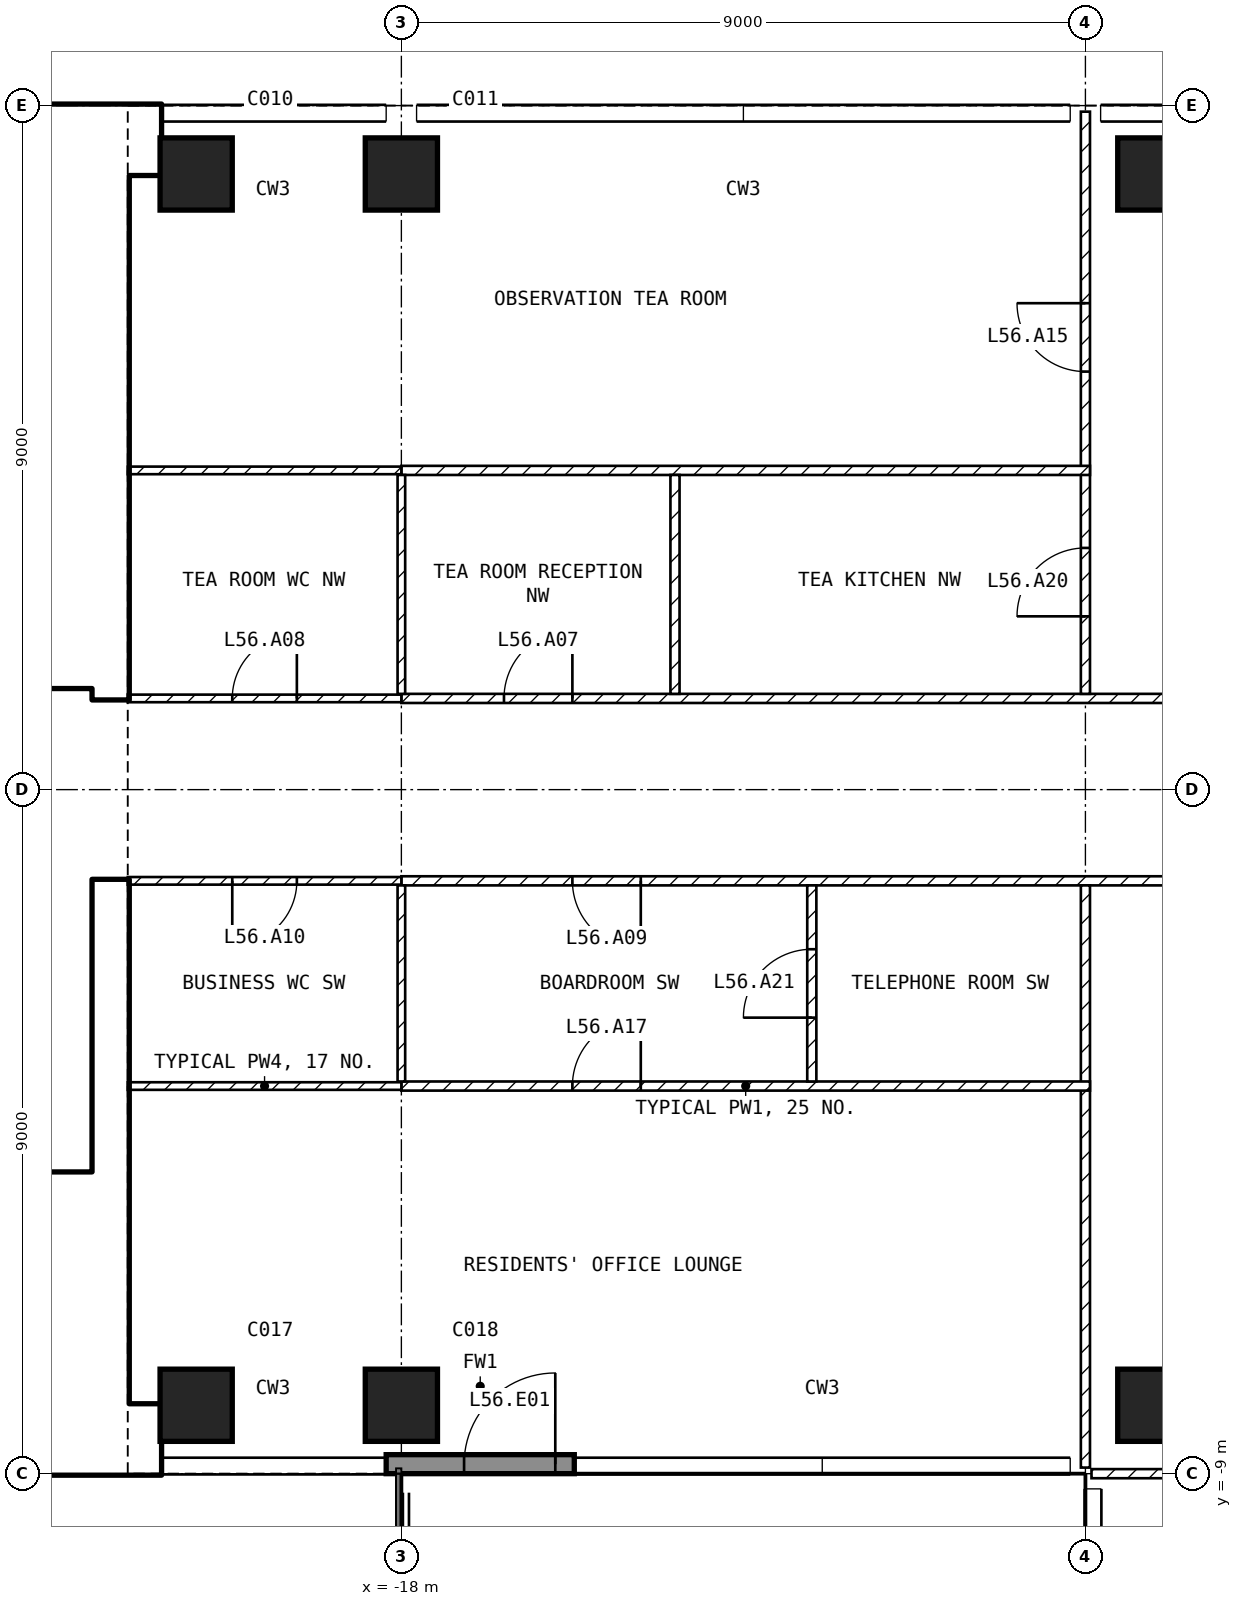
"""IFC4 building model, lengths in metres.
Left out: names, types, materials, properties, quantities, classifications, styles, units other than length and angle.
Written with IfcOpenShell. Run it as: python <this file> out.ifc"""

import sys

from ifc_helpers import new_model, si_unit, direction, frame, frame_2d, origin, origin_2d, place, context, subcontext, project, spatial, rectangle, extrude, element, fill, save


model = new_model("IFC4")
c1 = context("Model", 3, precision=1e-05, world=origin(), true_north=direction((0.0, 1.0)))
c2 = subcontext(c1, "Body", "Model", "MODEL_VIEW")
j1 = project(units=[si_unit("LENGTHUNIT", "METRE"), si_unit("PLANEANGLEUNIT", "RADIAN")], contexts=[c1])
p1 = place(None, origin())
s1 = spatial("IfcSite", under=j1, at=p1, CompositionType="ELEMENT")
p2 = place(p1, origin())
s2 = spatial("IfcBuilding", under=s1, at=p2, CompositionType="ELEMENT")
p3 = place(p2, frame((0.0, 0.0, 222.6)))
s3 = spatial("IfcBuildingStorey", under=s2, at=p3, CompositionType="ELEMENT", Elevation=222.6)
for number, where, z_axis, x_axis in (
    (1, (-20.7, -8.1, -0.3), (0.0, 0.0, 1.0), (1.0, 0.0, 0.0)),
    (2, (-20.7, 8.1, -0.3), (0.0, 0.0, 1.0), (1.0, 0.0, 0.0)),
    (3, (-18.0, -8.1, -0.3), (0.0, 0.0, 1.0), (1.0, 0.0, 0.0)),
    (4, (-18.0, 8.1, -0.3), (0.0, 0.0, 1.0), (1.0, 0.0, 0.0)),
    (5, (-8.1, -8.1, -0.3), (0.0, 0.0, 1.0), (1.0, 0.0, 0.0)),
    (6, (-8.1, 8.1, -0.3), (0.0, 0.0, 1.0), (1.0, 0.0, 0.0)),
):
    element("IfcColumn", number, at=place(p3, frame(where, z_axis=z_axis, x_axis=x_axis)), inside=s3, PredefinedType="COLUMN", context=c2, shape_type="SweptSolid", body=[
        extrude(rectangle(XDim=0.95, YDim=0.95, at=origin_2d()), origin(), (0.0, 0.0, 1.0), 5.25),
    ])
p4 = place(p3, frame((-18.2, -8.875, 0.0), z_axis=(0.0, 0.0, 1.0), x_axis=(1.0, 0.0, 0.0)))
e7 = element("IfcWall", 7, at=p4, inside=s3, PredefinedType="SOLIDWALL", context=c2, shape_type="SweptSolid", body=[
    extrude(rectangle(XDim=2.475, YDim=0.25, at=frame_2d((1.237, 0.0))), origin(), (0.0, 0.0, 1.0), 4.95),
])
p5 = place(p4, frame((1.025, 0.0, 0.0)))
e8 = element("IfcOpeningElement", 8, at=p5, cuts=e7, PredefinedType="OPENING", context=c2, shape_type="SweptSolid", body=[
    extrude(rectangle(XDim=1.2, YDim=2.4, at=frame_2d((0.6, 1.2))), frame((0.0, 0.135, 0.0), z_axis=(0.0, -1.0, 0.0), x_axis=(1.0, 0.0, 0.0)), (0.0, 0.0, 1.0), 0.27),
])
p6 = place(p3, frame((-30.2, -8.55, 0.0), z_axis=(0.0, 0.0, 1.0), x_axis=(1.0, 0.0, 0.0)))
e9 = element("IfcWall", 9, at=p6, inside=s3, PredefinedType="SHEAR", context=c2, shape_type="SweptSolid", body=[
    extrude(rectangle(XDim=9.025, YDim=0.9, at=frame_2d((4.512, 0.0))), origin(), (0.0, 0.0, 1.0), 4.95),
])
p7 = place(p3, frame((-29.6, 8.55, 0.0), z_axis=(0.0, 0.0, 1.0), x_axis=(1.0, 0.0, 0.0)))
e10 = element("IfcWall", 10, at=p7, inside=s3, PredefinedType="SHEAR", context=c2, shape_type="SweptSolid", body=[
    extrude(rectangle(XDim=8.425, YDim=0.9, at=frame_2d((4.212, 0.0))), origin(), (0.0, 0.0, 1.0), 4.95),
])
for number, where, z_axis, x_axis in (
    (11, (-21.825, -8.1, 0.0), (0.0, 0.0, 1.0), (0.0, 1.0, 0.0)),
    (12, (-21.825, 1.2, 0.0), (0.0, 0.0, 1.0), (0.0, 1.0, 0.0)),
):
    element("IfcWall", number, at=place(p3, frame(where, z_axis=z_axis, x_axis=x_axis)), inside=s3, PredefinedType="SHEAR", context=c2, shape_type="SweptSolid", body=[
        extrude(rectangle(XDim=6.9, YDim=0.45, at=frame_2d((3.45, 0.0))), origin(), (0.0, 0.0, 1.0), 4.95),
    ])
p8 = place(p3, frame((-33.2, 1.45, 0.0), z_axis=(0.0, 0.0, 1.0), x_axis=(1.0, 0.0, 0.0)))
e13 = element("IfcWall", 13, at=p8, inside=s3, PredefinedType="SOLIDWALL", context=c2, shape_type="SweptSolid", body=[
    extrude(rectangle(XDim=11.15, YDim=0.2, at=frame_2d((5.575, 0.0))), origin(), (0.0, 0.0, 1.0), 4.95),
])
p9 = place(p8, frame((9.4, 0.0, 0.0)))
e14 = element("IfcOpeningElement", 14, at=p9, cuts=e13, PredefinedType="OPENING", context=c2, shape_type="SweptSolid", body=[
    extrude(rectangle(XDim=1.0, YDim=2.1, at=frame_2d((0.5, 1.05))), frame((0.0, 0.11, 0.0), z_axis=(0.0, -1.0, 0.0), x_axis=(1.0, 0.0, 0.0)), (0.0, 0.0, 1.0), 0.22),
])
p10 = place(p8, frame((6.9, 0.0, 0.0)))
e15 = element("IfcOpeningElement", 15, at=p10, cuts=e13, PredefinedType="OPENING", context=c2, shape_type="SweptSolid", body=[
    extrude(rectangle(XDim=1.0, YDim=2.1, at=frame_2d((0.5, 1.05))), frame((0.0, 0.11, 0.0), z_axis=(0.0, -1.0, 0.0), x_axis=(1.0, 0.0, 0.0)), (0.0, 0.0, 1.0), 0.22),
])
p11 = place(p8, frame((1.1, 0.0, 0.0)))
e16 = element("IfcOpeningElement", 16, at=p11, cuts=e13, PredefinedType="OPENING", context=c2, shape_type="SweptSolid", body=[
    extrude(rectangle(XDim=0.9, YDim=2.1, at=frame_2d((0.45, 1.05))), frame((0.0, 0.11, 0.0), z_axis=(0.0, -1.0, 0.0), x_axis=(1.0, 0.0, 0.0)), (0.0, 0.0, 1.0), 0.22),
])
p12 = place(p3, frame((-28.35, 5.15, 0.0), z_axis=(0.0, 0.0, 1.0), x_axis=(1.0, 0.0, 0.0)))
e17 = element("IfcWall", 17, at=p12, inside=s3, PredefinedType="SOLIDWALL", context=c2, shape_type="SweptSolid", body=[
    extrude(rectangle(XDim=6.3, YDim=0.2, at=frame_2d((3.15, 0.0))), origin(), (0.0, 0.0, 1.0), 4.95),
])
p13 = place(p12, frame((5.1, 0.0, 0.0)))
e18 = element("IfcOpeningElement", 18, at=p13, cuts=e17, PredefinedType="OPENING", context=c2, shape_type="SweptSolid", body=[
    extrude(rectangle(XDim=1.0, YDim=2.1, at=frame_2d((0.5, 1.05))), frame((0.0, 0.11, 0.0), z_axis=(0.0, -1.0, 0.0), x_axis=(1.0, 0.0, 0.0)), (0.0, 0.0, 1.0), 0.22),
])
p14 = place(p3, frame((-28.35, -5.15, 0.0), z_axis=(0.0, 0.0, 1.0), x_axis=(1.0, 0.0, 0.0)))
e19 = element("IfcWall", 19, at=p14, inside=s3, PredefinedType="SOLIDWALL", context=c2, shape_type="SweptSolid", body=[
    extrude(rectangle(XDim=6.3, YDim=0.2, at=frame_2d((3.15, 0.0))), origin(), (0.0, 0.0, 1.0), 4.95),
])
p15 = place(p14, frame((5.1, 0.0, 0.0)))
e20 = element("IfcOpeningElement", 20, at=p15, cuts=e19, PredefinedType="OPENING", context=c2, shape_type="SweptSolid", body=[
    extrude(rectangle(XDim=1.0, YDim=2.1, at=frame_2d((0.5, 1.05))), frame((0.0, 0.11, 0.0), z_axis=(0.0, -1.0, 0.0), x_axis=(1.0, 0.0, 0.0)), (0.0, 0.0, 1.0), 0.22),
])
p16 = place(p3, frame((-18.0, 1.2, 0.0), z_axis=(0.0, 0.0, 1.0), x_axis=(1.0, 0.0, 0.0)))
e21 = element("IfcWall", 21, at=p16, inside=s3, PredefinedType="PARTITIONING", context=c2, shape_type="SweptSolid", body=[
    extrude(rectangle(XDim=30.6, YDim=0.12, at=frame_2d((15.3, 0.0))), origin(), (0.0, 0.0, 1.0), 4.95),
])
p17 = place(p16, frame((17.1, 0.0, 0.0)))
e22 = element("IfcOpeningElement", 22, at=p17, cuts=e21, PredefinedType="OPENING", context=c2, shape_type="SweptSolid", body=[
    extrude(rectangle(XDim=1.8, YDim=2.1, at=frame_2d((0.9, 1.05))), frame((0.0, 0.07, 0.0), z_axis=(0.0, -1.0, 0.0), x_axis=(1.0, 0.0, 0.0)), (0.0, 0.0, 1.0), 0.14),
])
p18 = place(p16, frame((1.35, 0.0, 0.0)))
e23 = element("IfcOpeningElement", 23, at=p18, cuts=e21, PredefinedType="OPENING", context=c2, shape_type="SweptSolid", body=[
    extrude(rectangle(XDim=0.9, YDim=2.1, at=frame_2d((0.45, 1.05))), frame((0.0, 0.07, 0.0), z_axis=(0.0, -1.0, 0.0), x_axis=(1.0, 0.0, 0.0)), (0.0, 0.0, 1.0), 0.14),
])
p19 = place(p3, frame((14.4, -1.2, 0.0), z_axis=(0.0, 0.0, 1.0), x_axis=(-1.0, 0.0, 0.0)))
e24 = element("IfcWall", 24, at=p19, inside=s3, PredefinedType="PARTITIONING", context=c2, shape_type="SweptSolid", body=[
    extrude(rectangle(XDim=32.4, YDim=0.12, at=frame_2d((16.2, 0.0))), origin(), (0.0, 0.0, 1.0), 4.95),
])
p20 = place(p19, frame((13.5, 0.0, 0.0)))
e25 = element("IfcOpeningElement", 25, at=p20, cuts=e24, PredefinedType="OPENING", context=c2, shape_type="SweptSolid", body=[
    extrude(rectangle(XDim=1.8, YDim=2.1, at=frame_2d((0.9, 1.05))), frame((0.0, 0.07, 0.0), z_axis=(0.0, -1.0, 0.0), x_axis=(1.0, 0.0, 0.0)), (0.0, 0.0, 1.0), 0.14),
])
p21 = place(p19, frame((3.45, 0.0, 0.0)))
e26 = element("IfcOpeningElement", 26, at=p21, cuts=e24, PredefinedType="OPENING", context=c2, shape_type="SweptSolid", body=[
    extrude(rectangle(XDim=0.9, YDim=2.1, at=frame_2d((0.45, 1.05))), frame((0.0, 0.07, 0.0), z_axis=(0.0, -1.0, 0.0), x_axis=(1.0, 0.0, 0.0)), (0.0, 0.0, 1.0), 0.14),
])
p22 = place(p19, frame((29.25, 0.0, 0.0)))
e27 = element("IfcOpeningElement", 27, at=p22, cuts=e24, PredefinedType="OPENING", context=c2, shape_type="SweptSolid", body=[
    extrude(rectangle(XDim=0.9, YDim=2.1, at=frame_2d((0.45, 1.05))), frame((0.0, 0.07, 0.0), z_axis=(0.0, -1.0, 0.0), x_axis=(1.0, 0.0, 0.0)), (0.0, 0.0, 1.0), 0.14),
])
p23 = place(p3, frame((-21.6, 1.2, 0.0), z_axis=(0.0, 0.0, 1.0), x_axis=(1.0, 0.0, 0.0)))
e28 = element("IfcWall", 28, at=p23, inside=s3, PredefinedType="PARTITIONING", context=c2, shape_type="SweptSolid", body=[
    extrude(rectangle(XDim=3.6, YDim=0.1, at=frame_2d((1.8, 0.0))), origin(), (0.0, 0.0, 1.0), 4.95),
])
p24 = place(p23, frame((1.375, 0.0, 0.0)))
e29 = element("IfcOpeningElement", 29, at=p24, cuts=e28, PredefinedType="OPENING", context=c2, shape_type="SweptSolid", body=[
    extrude(rectangle(XDim=0.85, YDim=2.1, at=frame_2d((0.425, 1.05))), frame((0.0, 0.06, 0.0), z_axis=(0.0, -1.0, 0.0), x_axis=(1.0, 0.0, 0.0)), (0.0, 0.0, 1.0), 0.12),
])
p25 = place(p3, frame((-18.0, -1.2, 0.0), z_axis=(0.0, 0.0, 1.0), x_axis=(-1.0, 0.0, 0.0)))
e30 = element("IfcWall", 30, at=p25, inside=s3, PredefinedType="PARTITIONING", context=c2, shape_type="SweptSolid", body=[
    extrude(rectangle(XDim=3.6, YDim=0.1, at=frame_2d((1.8, 0.0))), origin(), (0.0, 0.0, 1.0), 4.95),
])
p26 = place(p25, frame((1.375, 0.0, 0.0)))
e31 = element("IfcOpeningElement", 31, at=p26, cuts=e30, PredefinedType="OPENING", context=c2, shape_type="SweptSolid", body=[
    extrude(rectangle(XDim=0.85, YDim=2.1, at=frame_2d((0.425, 1.05))), frame((0.0, 0.06, 0.0), z_axis=(0.0, -1.0, 0.0), x_axis=(1.0, 0.0, 0.0)), (0.0, 0.0, 1.0), 0.12),
])
p27 = place(p3, frame((-9.0, 1.26, 0.0), z_axis=(0.0, 0.0, 1.0), x_axis=(0.0, 1.0, 0.0)))
e32 = element("IfcWall", 32, at=p27, inside=s3, PredefinedType="PARTITIONING", context=c2, shape_type="SweptSolid", body=[
    extrude(rectangle(XDim=7.66, YDim=0.12, at=frame_2d((3.83, 0.0))), origin(), (0.0, 0.0, 1.0), 4.95),
])
p28 = place(p27, frame((4.24, 0.0, 0.0)))
e33 = element("IfcOpeningElement", 33, at=p28, cuts=e32, PredefinedType="OPENING", context=c2, shape_type="SweptSolid", body=[
    extrude(rectangle(XDim=0.9, YDim=2.1, at=frame_2d((0.45, 1.05))), frame((0.0, 0.07, 0.0), z_axis=(0.0, -1.0, 0.0), x_axis=(1.0, 0.0, 0.0)), (0.0, 0.0, 1.0), 0.14),
])
p29 = place(p27, frame((1.02, 0.0, 0.0)))
e34 = element("IfcOpeningElement", 34, at=p29, cuts=e32, PredefinedType="OPENING", context=c2, shape_type="SweptSolid", body=[
    extrude(rectangle(XDim=0.9, YDim=2.1, at=frame_2d((0.45, 1.05))), frame((0.0, 0.07, 0.0), z_axis=(0.0, -1.0, 0.0), x_axis=(1.0, 0.0, 0.0)), (0.0, 0.0, 1.0), 0.14),
])
p30 = place(p3, frame((-9.0, -8.92, 0.0), z_axis=(0.0, 0.0, 1.0), x_axis=(0.0, 1.0, 0.0)))
e35 = element("IfcWall", 35, at=p30, inside=s3, PredefinedType="PARTITIONING", context=c2, shape_type="SweptSolid", body=[
    extrude(rectangle(XDim=7.66, YDim=0.12, at=frame_2d((3.83, 0.0))), origin(), (0.0, 0.0, 1.0), 4.95),
])
p31 = place(p3, frame((2.1, -9.0, 0.0), z_axis=(0.0, 0.0, 1.0), x_axis=(-1.0, 0.0, 0.0)))
e36 = element("IfcWall", 36, at=p31, inside=s3, PredefinedType="PARTITIONING", context=c2, shape_type="SweptSolid", body=[
    extrude(rectangle(XDim=11.02, YDim=0.12, at=frame_2d((5.51, 0.0))), origin(), (0.0, 0.0, 1.0), 4.95),
])
p32 = place(p31, frame((1.2, 0.0, 0.0)))
e37 = element("IfcOpeningElement", 37, at=p32, cuts=e36, PredefinedType="OPENING", context=c2, shape_type="SweptSolid", body=[
    extrude(rectangle(XDim=1.8, YDim=2.1, at=frame_2d((0.9, 1.05))), frame((0.0, 0.07, 0.0), z_axis=(0.0, -1.0, 0.0), x_axis=(1.0, 0.0, 0.0)), (0.0, 0.0, 1.0), 0.14),
])
p33 = place(p3, frame((-8.94, 4.2, 0.0), z_axis=(0.0, 0.0, 1.0), x_axis=(-1.0, 0.0, 0.0)))
e38 = element("IfcWall", 38, at=p33, inside=s3, PredefinedType="PARTITIONING", context=c2, shape_type="SweptSolid", body=[
    extrude(rectangle(XDim=9.06, YDim=0.12, at=frame_2d((4.53, 0.0))), origin(), (0.0, 0.0, 1.0), 4.95),
])
p34 = place(p3, frame((-18.0, 4.2, 0.0), z_axis=(0.0, 0.0, 1.0), x_axis=(-1.0, 0.0, 0.0)))
e39 = element("IfcWall", 39, at=p34, inside=s3, PredefinedType="PARTITIONING", context=c2, shape_type="SweptSolid", body=[
    extrude(rectangle(XDim=3.6, YDim=0.1, at=frame_2d((1.8, 0.0))), origin(), (0.0, 0.0, 1.0), 4.95),
])
p35 = place(p3, frame((-14.4, 1.26, 0.0), z_axis=(0.0, 0.0, 1.0), x_axis=(0.0, 1.0, 0.0)))
e40 = element("IfcWall", 40, at=p35, inside=s3, PredefinedType="PARTITIONING", context=c2, shape_type="SweptSolid", body=[
    extrude(rectangle(XDim=2.88, YDim=0.12, at=frame_2d((1.44, 0.0))), origin(), (0.0, 0.0, 1.0), 4.95),
])
p36 = place(p3, frame((-18.0, 1.26, 0.0), z_axis=(0.0, 0.0, 1.0), x_axis=(0.0, 1.0, 0.0)))
e41 = element("IfcWall", 41, at=p36, inside=s3, PredefinedType="PARTITIONING", context=c2, shape_type="SweptSolid", body=[
    extrude(rectangle(XDim=2.88, YDim=0.1, at=frame_2d((1.44, 0.0))), origin(), (0.0, 0.0, 1.0), 4.18),
])
p37 = place(p3, frame((-18.0, -3.9, 0.0), z_axis=(0.0, 0.0, 1.0), x_axis=(1.0, 0.0, 0.0)))
e42 = element("IfcWall", 42, at=p37, inside=s3, PredefinedType="PARTITIONING", context=c2, shape_type="SweptSolid", body=[
    extrude(rectangle(XDim=9.06, YDim=0.12, at=frame_2d((4.53, 0.0))), origin(), (0.0, 0.0, 1.0), 4.95),
])
p38 = place(p37, frame((2.25, 0.0, 0.0)))
e43 = element("IfcOpeningElement", 43, at=p38, cuts=e42, PredefinedType="OPENING", context=c2, shape_type="SweptSolid", body=[
    extrude(rectangle(XDim=0.9, YDim=2.1, at=frame_2d((0.45, 1.05))), frame((0.0, 0.07, 0.0), z_axis=(0.0, -1.0, 0.0), x_axis=(1.0, 0.0, 0.0)), (0.0, 0.0, 1.0), 0.14),
])
p39 = place(p3, frame((-21.6, -3.9, 0.0), z_axis=(0.0, 0.0, 1.0), x_axis=(1.0, 0.0, 0.0)))
e44 = element("IfcWall", 44, at=p39, inside=s3, PredefinedType="PARTITIONING", context=c2, shape_type="SweptSolid", body=[
    extrude(rectangle(XDim=3.6, YDim=0.1, at=frame_2d((1.8, 0.0))), origin(), (0.0, 0.0, 1.0), 4.95),
])
p40 = place(p3, frame((-12.6, -3.84, 0.0), z_axis=(0.0, 0.0, 1.0), x_axis=(0.0, 1.0, 0.0)))
e45 = element("IfcWall", 45, at=p40, inside=s3, PredefinedType="PARTITIONING", context=c2, shape_type="SweptSolid", body=[
    extrude(rectangle(XDim=2.58, YDim=0.12, at=frame_2d((1.29, 0.0))), origin(), (0.0, 0.0, 1.0), 4.95),
])
p41 = place(p40, frame((0.84, 0.0, 0.0)))
e46 = element("IfcOpeningElement", 46, at=p41, cuts=e45, PredefinedType="OPENING", context=c2, shape_type="SweptSolid", body=[
    extrude(rectangle(XDim=0.9, YDim=2.1, at=frame_2d((0.45, 1.05))), frame((0.0, 0.07, 0.0), z_axis=(0.0, -1.0, 0.0), x_axis=(1.0, 0.0, 0.0)), (0.0, 0.0, 1.0), 0.14),
])
p42 = place(p3, frame((-18.0, -3.84, 0.0), z_axis=(0.0, 0.0, 1.0), x_axis=(0.0, 1.0, 0.0)))
e47 = element("IfcWall", 47, at=p42, inside=s3, PredefinedType="PARTITIONING", context=c2, shape_type="SweptSolid", body=[
    extrude(rectangle(XDim=2.58, YDim=0.1, at=frame_2d((1.29, 0.0))), origin(), (0.0, 0.0, 1.0), 4.18),
])
p43 = place(p5, origin())
e48 = element("IfcDoor", 48, at=p43, inside=s3, OperationType="SINGLE_SWING_RIGHT", PredefinedType="DOOR", context=c2, shape_type="SweptSolid", body=[
    extrude(rectangle(XDim=1.2, YDim=2.4, at=frame_2d((0.6, 1.2))), frame((0.0, 0.025, 0.0), z_axis=(0.0, -1.0, 0.0), x_axis=(1.0, 0.0, 0.0)), (0.0, 0.0, 1.0), 0.05),
])
fill(e8, e48)
p44 = place(p15, origin())
e49 = element("IfcDoor", 49, at=p44, inside=s3, OperationType="SINGLE_SWING_LEFT", PredefinedType="DOOR", context=c2, shape_type="SweptSolid", body=[
    extrude(rectangle(XDim=1.0, YDim=2.1, at=frame_2d((0.5, 1.05))), frame((0.0, 0.025, 0.0), z_axis=(0.0, -1.0, 0.0), x_axis=(1.0, 0.0, 0.0)), (0.0, 0.0, 1.0), 0.05),
])
fill(e20, e49)
p45 = place(p13, origin())
e50 = element("IfcDoor", 50, at=p45, inside=s3, OperationType="SINGLE_SWING_LEFT", PredefinedType="DOOR", context=c2, shape_type="SweptSolid", body=[
    extrude(rectangle(XDim=1.0, YDim=2.1, at=frame_2d((0.5, 1.05))), frame((0.0, 0.025, 0.0), z_axis=(0.0, -1.0, 0.0), x_axis=(1.0, 0.0, 0.0)), (0.0, 0.0, 1.0), 0.05),
])
fill(e18, e50)
p46 = place(p18, origin())
e51 = element("IfcDoor", 51, at=p46, inside=s3, OperationType="SINGLE_SWING_RIGHT", PredefinedType="DOOR", context=c2, shape_type="SweptSolid", body=[
    extrude(rectangle(XDim=0.9, YDim=2.1, at=frame_2d((0.45, 1.05))), frame((0.0, 0.025, 0.0), z_axis=(0.0, -1.0, 0.0), x_axis=(1.0, 0.0, 0.0)), (0.0, 0.0, 1.0), 0.05),
])
fill(e23, e51)
p47 = place(p24, origin())
e52 = element("IfcDoor", 52, at=p47, inside=s3, OperationType="SINGLE_SWING_RIGHT", PredefinedType="DOOR", context=c2, shape_type="SweptSolid", body=[
    extrude(rectangle(XDim=0.85, YDim=2.1, at=frame_2d((0.425, 1.05))), frame((0.0, 0.025, 0.0), z_axis=(0.0, -1.0, 0.0), x_axis=(1.0, 0.0, 0.0)), (0.0, 0.0, 1.0), 0.05),
])
fill(e29, e52)
p48 = place(p22, origin())
e53 = element("IfcDoor", 53, at=p48, inside=s3, OperationType="SINGLE_SWING_LEFT", PredefinedType="DOOR", context=c2, shape_type="SweptSolid", body=[
    extrude(rectangle(XDim=0.9, YDim=2.1, at=frame_2d((0.45, 1.05))), frame((0.0, 0.025, 0.0), z_axis=(0.0, -1.0, 0.0), x_axis=(1.0, 0.0, 0.0)), (0.0, 0.0, 1.0), 0.05),
])
fill(e27, e53)
p49 = place(p26, origin())
e54 = element("IfcDoor", 54, at=p49, inside=s3, OperationType="SINGLE_SWING_RIGHT", PredefinedType="DOOR", context=c2, shape_type="SweptSolid", body=[
    extrude(rectangle(XDim=0.85, YDim=2.1, at=frame_2d((0.425, 1.05))), frame((0.0, 0.025, 0.0), z_axis=(0.0, -1.0, 0.0), x_axis=(1.0, 0.0, 0.0)), (0.0, 0.0, 1.0), 0.05),
])
fill(e31, e54)
p50 = place(p28, origin())
e55 = element("IfcDoor", 55, at=p50, inside=s3, OperationType="SINGLE_SWING_RIGHT", PredefinedType="DOOR", context=c2, shape_type="SweptSolid", body=[
    extrude(rectangle(XDim=0.9, YDim=2.1, at=frame_2d((0.45, 1.05))), frame((0.0, 0.025, 0.0), z_axis=(0.0, -1.0, 0.0), x_axis=(1.0, 0.0, 0.0)), (0.0, 0.0, 1.0), 0.05),
])
fill(e33, e55)
p51 = place(p38, origin())
e56 = element("IfcDoor", 56, at=p51, inside=s3, OperationType="SINGLE_SWING_RIGHT", PredefinedType="DOOR", context=c2, shape_type="SweptSolid", body=[
    extrude(rectangle(XDim=0.9, YDim=2.1, at=frame_2d((0.45, 1.05))), frame((0.0, 0.025, 0.0), z_axis=(0.0, -1.0, 0.0), x_axis=(1.0, 0.0, 0.0)), (0.0, 0.0, 1.0), 0.05),
])
fill(e43, e56)
p52 = place(p29, origin())
e57 = element("IfcDoor", 57, at=p52, inside=s3, OperationType="SINGLE_SWING_LEFT", PredefinedType="DOOR", context=c2, shape_type="SweptSolid", body=[
    extrude(rectangle(XDim=0.9, YDim=2.1, at=frame_2d((0.45, 1.05))), frame((0.0, 0.025, 0.0), z_axis=(0.0, -1.0, 0.0), x_axis=(1.0, 0.0, 0.0)), (0.0, 0.0, 1.0), 0.05),
])
fill(e34, e57)
p53 = place(p41, origin())
e58 = element("IfcDoor", 58, at=p53, inside=s3, OperationType="SINGLE_SWING_LEFT", PredefinedType="DOOR", context=c2, shape_type="SweptSolid", body=[
    extrude(rectangle(XDim=0.9, YDim=2.1, at=frame_2d((0.45, 1.05))), frame((0.0, 0.025, 0.0), z_axis=(0.0, -1.0, 0.0), x_axis=(1.0, 0.0, 0.0)), (0.0, 0.0, 1.0), 0.05),
])
fill(e46, e58)
save(model, sys.argv[1])
